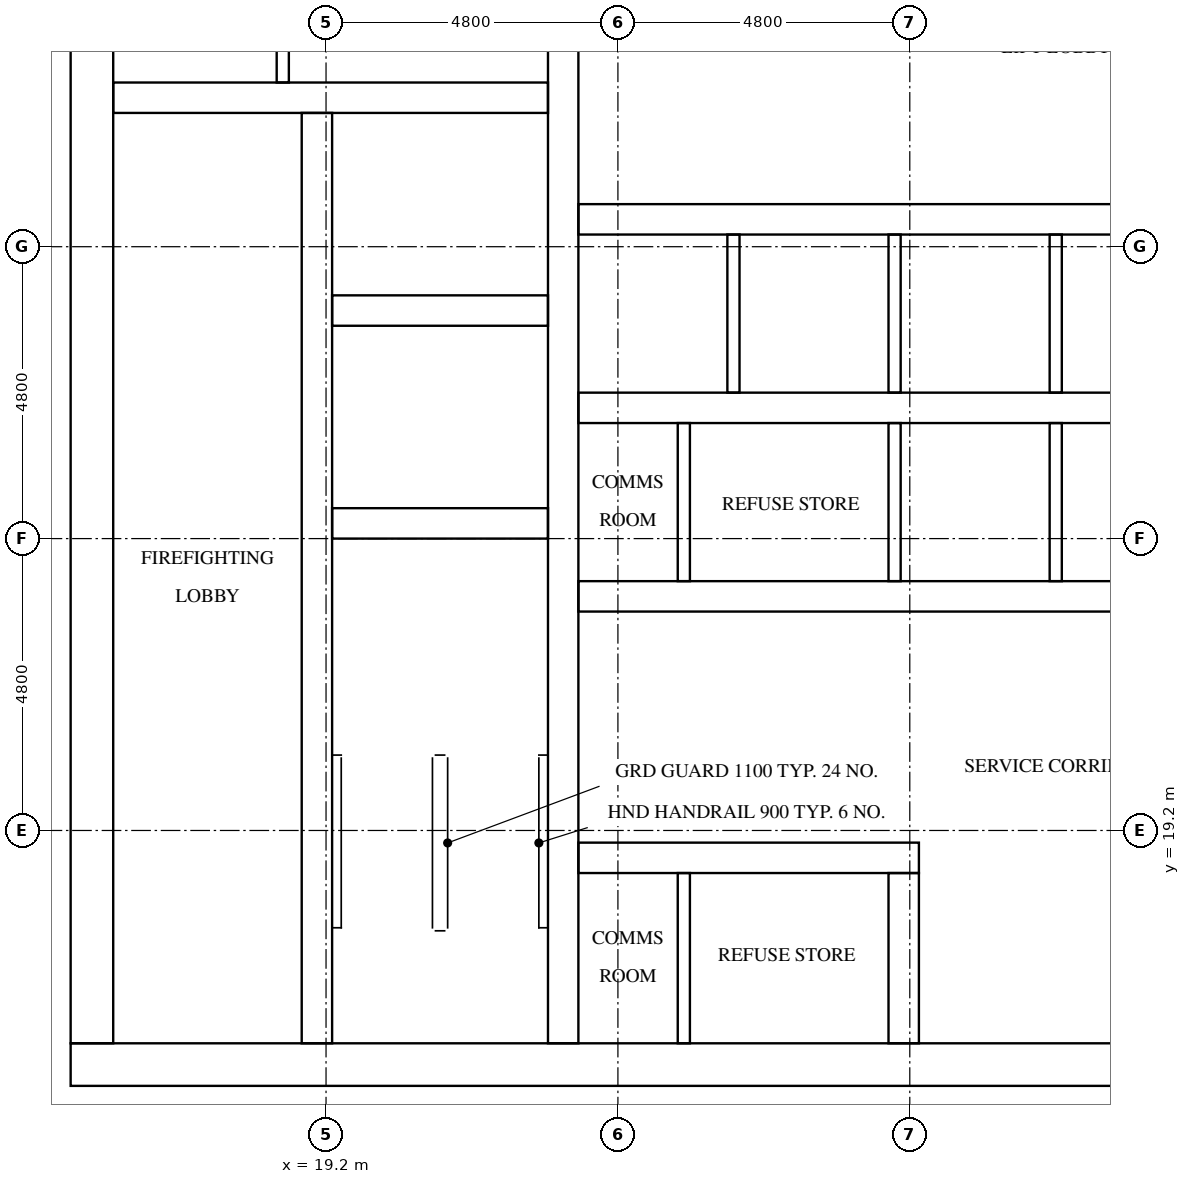
"""IFC4 building model, lengths in metres.
Left out: names, types, materials, properties, quantities, classifications, styles, units other than length and angle.
Written with IfcOpenShell. Run it as: python <this file> out.ifc"""

import sys

from ifc_helpers import new_model, si_unit, direction, frame, frame_2d, origin, place, context, subcontext, project, spatial, rectangle, extrude, element, fill, save


model = new_model("IFC4")
c1 = context("Model", 3, precision=1e-05, world=origin(), true_north=direction((0.0, 1.0)))
c2 = subcontext(c1, "Body", "Model", "MODEL_VIEW")
j1 = project(units=[si_unit("LENGTHUNIT", "METRE"), si_unit("PLANEANGLEUNIT", "RADIAN")], contexts=[c1])
p1 = place(None, origin())
s1 = spatial("IfcSite", under=j1, at=p1, CompositionType="ELEMENT")
p2 = place(p1, origin())
s2 = spatial("IfcBuilding", under=s1, at=p2, CompositionType="ELEMENT")
p3 = place(p2, frame((0.0, 0.0, 178.9)))
s3 = spatial("IfcBuildingStorey", under=s2, at=p3, CompositionType="ELEMENT", Elevation=178.9)
p4 = place(p3, frame((15.0, 15.35, 0.0), z_axis=(0.0, 0.0, 1.0), x_axis=(1.0, 0.0, 0.0)))
e1 = element("IfcWall", 1, at=p4, inside=s3, PredefinedType="SHEAR", context=c2, shape_type="SweptSolid", body=[
    extrude(rectangle(XDim=32.4, YDim=0.7, at=frame_2d((16.2, 0.0))), origin(), (0.0, 0.0, 1.0), 3.2),
])
p5 = place(p4, frame((15.3, 0.0, 0.0)))
e2 = element("IfcOpeningElement", 2, at=p5, cuts=e1, PredefinedType="OPENING", context=c2, shape_type="SweptSolid", body=[
    extrude(rectangle(XDim=1.8, YDim=2.1, at=frame_2d((0.9, 1.05))), frame((0.0, 0.36, 0.0), z_axis=(0.0, -1.0, 0.0), x_axis=(1.0, 0.0, 0.0)), (0.0, 0.0, 1.0), 0.72),
])
p6 = place(p3, frame((15.35, 15.7, 0.0), z_axis=(0.0, 0.0, 1.0), x_axis=(0.0, 1.0, 0.0)))
e3 = element("IfcWall", 3, at=p6, inside=s3, PredefinedType="SHEAR", context=c2, shape_type="SweptSolid", body=[
    extrude(rectangle(XDim=21.4, YDim=0.7, at=frame_2d((10.7, 0.0))), origin(), (0.0, 0.0, 1.0), 3.2),
])
p7 = place(p6, frame((5.06, 0.0, 0.0)))
e4 = element("IfcOpeningElement", 4, at=p7, cuts=e3, PredefinedType="OPENING", context=c2, shape_type="SweptSolid", body=[
    extrude(rectangle(XDim=1.2, YDim=2.1, at=frame_2d((0.6, 1.05))), frame((0.0, 0.36, 0.0), z_axis=(0.0, -1.0, 0.0), x_axis=(1.0, 0.0, 0.0)), (0.0, 0.0, 1.0), 0.72),
])
p8 = place(p3, frame((19.05, 15.7, 0.0), z_axis=(0.0, 0.0, 1.0), x_axis=(0.0, 1.0, 0.0)))
e5 = element("IfcWall", 5, at=p8, inside=s3, PredefinedType="SHEAR", context=c2, shape_type="SweptSolid", body=[
    extrude(rectangle(XDim=15.3, YDim=0.5, at=frame_2d((7.65, 0.0))), origin(), (0.0, 0.0, 1.0), 3.2),
])
p9 = place(p8, frame((9.75, 0.0, 0.0)))
e6 = element("IfcOpeningElement", 6, at=p9, cuts=e5, PredefinedType="OPENING", context=c2, shape_type="SweptSolid", body=[
    extrude(rectangle(XDim=1.1, YDim=2.1, at=frame_2d((0.55, 1.05))), frame((0.0, 0.26, 0.0), z_axis=(0.0, -1.0, 0.0), x_axis=(1.0, 0.0, 0.0)), (0.0, 0.0, 1.0), 0.52),
])
p10 = place(p8, frame((13.25, 0.0, 0.0)))
e7 = element("IfcOpeningElement", 7, at=p10, cuts=e5, PredefinedType="OPENING", context=c2, shape_type="SweptSolid", body=[
    extrude(rectangle(XDim=1.1, YDim=2.1, at=frame_2d((0.55, 1.05))), frame((0.0, 0.26, 0.0), z_axis=(0.0, -1.0, 0.0), x_axis=(1.0, 0.0, 0.0)), (0.0, 0.0, 1.0), 0.52),
])
p11 = place(p8, frame((0.5, 0.0, 0.0)))
e8 = element("IfcOpeningElement", 8, at=p11, cuts=e5, PredefinedType="OPENING", context=c2, shape_type="SweptSolid", body=[
    extrude(rectangle(XDim=1.2, YDim=2.1, at=frame_2d((0.6, 1.05))), frame((0.0, 0.26, 0.0), z_axis=(0.0, -1.0, 0.0), x_axis=(1.0, 0.0, 0.0)), (0.0, 0.0, 1.0), 0.52),
])
p12 = place(p3, frame((23.1, 15.7, 0.0), z_axis=(0.0, 0.0, 1.0), x_axis=(0.0, 1.0, 0.0)))
e9 = element("IfcWall", 9, at=p12, inside=s3, PredefinedType="SHEAR", context=c2, shape_type="SweptSolid", body=[
    extrude(rectangle(XDim=21.4, YDim=0.5, at=frame_2d((10.7, 0.0))), origin(), (0.0, 0.0, 1.0), 3.2),
])
for number, where, z_axis, x_axis in (
    (10, (19.3, 24.25, 0.0), (0.0, 0.0, 1.0), (1.0, 0.0, 0.0)),
    (11, (19.3, 27.75, 0.0), (0.0, 0.0, 1.0), (1.0, 0.0, 0.0)),
):
    element("IfcWall", number, at=place(p3, frame(where, z_axis=z_axis, x_axis=x_axis)), inside=s3, PredefinedType="SHEAR", context=c2, shape_type="SweptSolid", body=[
        extrude(rectangle(XDim=3.55, YDim=0.5, at=frame_2d((1.775, 0.0))), origin(), (0.0, 0.0, 1.0), 3.2),
    ])
p13 = place(p3, frame((15.7, 31.25, 0.0), z_axis=(0.0, 0.0, 1.0), x_axis=(1.0, 0.0, 0.0)))
e12 = element("IfcWall", 12, at=p13, inside=s3, PredefinedType="SHEAR", context=c2, shape_type="SweptSolid", body=[
    extrude(rectangle(XDim=7.15, YDim=0.5, at=frame_2d((3.575, 0.0))), origin(), (0.0, 0.0, 1.0), 3.2),
])
p14 = place(p3, frame((23.35, 18.75, 0.0), z_axis=(0.0, 0.0, 1.0), x_axis=(1.0, 0.0, 0.0)))
e13 = element("IfcWall", 13, at=p14, inside=s3, PredefinedType="SHEAR", context=c2, shape_type="SweptSolid", body=[
    extrude(rectangle(XDim=5.6, YDim=0.5, at=frame_2d((2.8, 0.0))), origin(), (0.0, 0.0, 1.0), 3.2),
])
p15 = place(p14, frame((0.317, 0.0, 0.0)))
e14 = element("IfcOpeningElement", 14, at=p15, cuts=e13, PredefinedType="OPENING", context=c2, shape_type="SweptSolid", body=[
    extrude(rectangle(XDim=1.0, YDim=2.1, at=frame_2d((0.5, 1.05))), frame((0.0, 0.26, 0.0), z_axis=(0.0, -1.0, 0.0), x_axis=(1.0, 0.0, 0.0)), (0.0, 0.0, 1.0), 0.52),
])
p16 = place(p14, frame((2.967, 0.0, 0.0)))
e15 = element("IfcOpeningElement", 15, at=p16, cuts=e13, PredefinedType="OPENING", context=c2, shape_type="SweptSolid", body=[
    extrude(rectangle(XDim=1.0, YDim=2.1, at=frame_2d((0.5, 1.05))), frame((0.0, 0.26, 0.0), z_axis=(0.0, -1.0, 0.0), x_axis=(1.0, 0.0, 0.0)), (0.0, 0.0, 1.0), 0.52),
])
p17 = place(p3, frame((23.35, 23.05, 0.0), z_axis=(0.0, 0.0, 1.0), x_axis=(1.0, 0.0, 0.0)))
e16 = element("IfcWall", 16, at=p17, inside=s3, PredefinedType="SHEAR", context=c2, shape_type="SweptSolid", body=[
    extrude(rectangle(XDim=15.7, YDim=0.5, at=frame_2d((7.85, 0.0))), origin(), (0.0, 0.0, 1.0), 3.2),
])
p18 = place(p17, frame((0.317, 0.0, 0.0)))
e17 = element("IfcOpeningElement", 17, at=p18, cuts=e16, PredefinedType="OPENING", context=c2, shape_type="SweptSolid", body=[
    extrude(rectangle(XDim=1.0, YDim=2.1, at=frame_2d((0.5, 1.05))), frame((0.0, 0.26, 0.0), z_axis=(0.0, -1.0, 0.0), x_axis=(1.0, 0.0, 0.0)), (0.0, 0.0, 1.0), 0.52),
])
p19 = place(p17, frame((2.967, 0.0, 0.0)))
e18 = element("IfcOpeningElement", 18, at=p19, cuts=e16, PredefinedType="OPENING", context=c2, shape_type="SweptSolid", body=[
    extrude(rectangle(XDim=1.0, YDim=2.1, at=frame_2d((0.5, 1.05))), frame((0.0, 0.26, 0.0), z_axis=(0.0, -1.0, 0.0), x_axis=(1.0, 0.0, 0.0)), (0.0, 0.0, 1.0), 0.52),
])
p20 = place(p17, frame((10.917, 0.0, 0.0)))
e19 = element("IfcOpeningElement", 19, at=p20, cuts=e16, PredefinedType="OPENING", context=c2, shape_type="SweptSolid", body=[
    extrude(rectangle(XDim=1.0, YDim=2.1, at=frame_2d((0.5, 1.05))), frame((0.0, 0.26, 0.0), z_axis=(0.0, -1.0, 0.0), x_axis=(1.0, 0.0, 0.0)), (0.0, 0.0, 1.0), 0.52),
])
p21 = place(p17, frame((13.567, 0.0, 0.0)))
e20 = element("IfcOpeningElement", 20, at=p21, cuts=e16, PredefinedType="OPENING", context=c2, shape_type="SweptSolid", body=[
    extrude(rectangle(XDim=1.0, YDim=2.1, at=frame_2d((0.5, 1.05))), frame((0.0, 0.26, 0.0), z_axis=(0.0, -1.0, 0.0), x_axis=(1.0, 0.0, 0.0)), (0.0, 0.0, 1.0), 0.52),
])
p22 = place(p3, frame((23.35, 26.15, 0.0), z_axis=(0.0, 0.0, 1.0), x_axis=(1.0, 0.0, 0.0)))
e21 = element("IfcWall", 21, at=p22, inside=s3, PredefinedType="SHEAR", context=c2, shape_type="SweptSolid", body=[
    extrude(rectangle(XDim=15.7, YDim=0.5, at=frame_2d((7.85, 0.0))), origin(), (0.0, 0.0, 1.0), 3.2),
])
p23 = place(p3, frame((23.35, 29.25, 0.0), z_axis=(0.0, 0.0, 1.0), x_axis=(1.0, 0.0, 0.0)))
e22 = element("IfcWall", 22, at=p23, inside=s3, PredefinedType="SHEAR", context=c2, shape_type="SweptSolid", body=[
    extrude(rectangle(XDim=15.7, YDim=0.5, at=frame_2d((7.85, 0.0))), origin(), (0.0, 0.0, 1.0), 3.2),
])
p24 = place(p23, frame((0.675, 0.0, 0.0)))
e23 = element("IfcOpeningElement", 23, at=p24, cuts=e22, PredefinedType="OPENING", context=c2, shape_type="SweptSolid", body=[
    extrude(rectangle(XDim=1.1, YDim=2.1, at=frame_2d((0.55, 1.05))), frame((0.0, 0.26, 0.0), z_axis=(0.0, -1.0, 0.0), x_axis=(1.0, 0.0, 0.0)), (0.0, 0.0, 1.0), 0.52),
])
p25 = place(p23, frame((3.325, 0.0, 0.0)))
e24 = element("IfcOpeningElement", 24, at=p25, cuts=e22, PredefinedType="OPENING", context=c2, shape_type="SweptSolid", body=[
    extrude(rectangle(XDim=1.1, YDim=2.1, at=frame_2d((0.55, 1.05))), frame((0.0, 0.26, 0.0), z_axis=(0.0, -1.0, 0.0), x_axis=(1.0, 0.0, 0.0)), (0.0, 0.0, 1.0), 0.52),
])
p26 = place(p23, frame((5.975, 0.0, 0.0)))
e25 = element("IfcOpeningElement", 25, at=p26, cuts=e22, PredefinedType="OPENING", context=c2, shape_type="SweptSolid", body=[
    extrude(rectangle(XDim=1.1, YDim=2.1, at=frame_2d((0.55, 1.05))), frame((0.0, 0.26, 0.0), z_axis=(0.0, -1.0, 0.0), x_axis=(1.0, 0.0, 0.0)), (0.0, 0.0, 1.0), 0.52),
])
p27 = place(p23, frame((8.625, 0.0, 0.0)))
e26 = element("IfcOpeningElement", 26, at=p27, cuts=e22, PredefinedType="OPENING", context=c2, shape_type="SweptSolid", body=[
    extrude(rectangle(XDim=1.1, YDim=2.1, at=frame_2d((0.55, 1.05))), frame((0.0, 0.26, 0.0), z_axis=(0.0, -1.0, 0.0), x_axis=(1.0, 0.0, 0.0)), (0.0, 0.0, 1.0), 0.52),
])
p28 = place(p23, frame((11.275, 0.0, 0.0)))
e27 = element("IfcOpeningElement", 27, at=p28, cuts=e22, PredefinedType="OPENING", context=c2, shape_type="SweptSolid", body=[
    extrude(rectangle(XDim=1.1, YDim=2.1, at=frame_2d((0.55, 1.05))), frame((0.0, 0.26, 0.0), z_axis=(0.0, -1.0, 0.0), x_axis=(1.0, 0.0, 0.0)), (0.0, 0.0, 1.0), 0.52),
])
p29 = place(p23, frame((13.925, 0.0, 0.0)))
e28 = element("IfcOpeningElement", 28, at=p29, cuts=e22, PredefinedType="OPENING", context=c2, shape_type="SweptSolid", body=[
    extrude(rectangle(XDim=1.1, YDim=2.1, at=frame_2d((0.55, 1.05))), frame((0.0, 0.26, 0.0), z_axis=(0.0, -1.0, 0.0), x_axis=(1.0, 0.0, 0.0)), (0.0, 0.0, 1.0), 0.52),
])
p30 = place(p3, frame((28.7, 15.7, 0.0), z_axis=(0.0, 0.0, 1.0), x_axis=(0.0, 1.0, 0.0)))
e29 = element("IfcWall", 29, at=p30, inside=s3, PredefinedType="SHEAR", context=c2, shape_type="SweptSolid", body=[
    extrude(rectangle(XDim=2.8, YDim=0.5, at=frame_2d((1.4, 0.0))), origin(), (0.0, 0.0, 1.0), 3.2),
])
p31 = place(p3, frame((25.9, 26.4, 0.0), z_axis=(0.0, 0.0, 1.0), x_axis=(0.0, 1.0, 0.0)))
e30 = element("IfcWall", 30, at=p31, inside=s3, PredefinedType="SOLIDWALL", context=c2, shape_type="SweptSolid", body=[
    extrude(rectangle(XDim=2.6, YDim=0.2, at=frame_2d((1.3, 0.0))), origin(), (0.0, 0.0, 1.0), 3.2),
])
p32 = place(p3, frame((28.55, 23.3, 0.0), z_axis=(0.0, 0.0, 1.0), x_axis=(0.0, 1.0, 0.0)))
e31 = element("IfcWall", 31, at=p32, inside=s3, PredefinedType="SOLIDWALL", context=c2, shape_type="SweptSolid", body=[
    extrude(rectangle(XDim=2.6, YDim=0.2, at=frame_2d((1.3, 0.0))), origin(), (0.0, 0.0, 1.0), 3.2),
])
p33 = place(p3, frame((28.55, 26.4, 0.0), z_axis=(0.0, 0.0, 1.0), x_axis=(0.0, 1.0, 0.0)))
e32 = element("IfcWall", 32, at=p33, inside=s3, PredefinedType="SOLIDWALL", context=c2, shape_type="SweptSolid", body=[
    extrude(rectangle(XDim=2.6, YDim=0.2, at=frame_2d((1.3, 0.0))), origin(), (0.0, 0.0, 1.0), 3.2),
])
p34 = place(p3, frame((31.2, 23.3, 0.0), z_axis=(0.0, 0.0, 1.0), x_axis=(0.0, 1.0, 0.0)))
e33 = element("IfcWall", 33, at=p34, inside=s3, PredefinedType="SOLIDWALL", context=c2, shape_type="SweptSolid", body=[
    extrude(rectangle(XDim=2.6, YDim=0.2, at=frame_2d((1.3, 0.0))), origin(), (0.0, 0.0, 1.0), 3.2),
])
p35 = place(p3, frame((31.2, 26.4, 0.0), z_axis=(0.0, 0.0, 1.0), x_axis=(0.0, 1.0, 0.0)))
e34 = element("IfcWall", 34, at=p35, inside=s3, PredefinedType="SOLIDWALL", context=c2, shape_type="SweptSolid", body=[
    extrude(rectangle(XDim=2.6, YDim=0.2, at=frame_2d((1.3, 0.0))), origin(), (0.0, 0.0, 1.0), 3.2),
])
p36 = place(p3, frame((18.489, 31.5, 0.0), z_axis=(0.0, 0.0, 1.0), x_axis=(0.0, 1.0, 0.0)))
e35 = element("IfcWall", 35, at=p36, inside=s3, PredefinedType="PARTITIONING", context=c2, shape_type="SweptSolid", body=[
    extrude(rectangle(XDim=5.6, YDim=0.2, at=frame_2d((2.8, 0.0))), origin(), (0.0, 0.0, 1.0), 3.2),
])
p37 = place(p3, frame((25.084, 23.3, 0.0), z_axis=(0.0, 0.0, 1.0), x_axis=(0.0, 1.0, 0.0)))
e36 = element("IfcWall", 36, at=p37, inside=s3, PredefinedType="PARTITIONING", context=c2, shape_type="SweptSolid", body=[
    extrude(rectangle(XDim=2.6, YDim=0.2, at=frame_2d((1.3, 0.0))), origin(), (0.0, 0.0, 1.0), 3.2),
])
p38 = place(p3, frame((25.084, 15.7, 0.0), z_axis=(0.0, 0.0, 1.0), x_axis=(0.0, 1.0, 0.0)))
e37 = element("IfcWall", 37, at=p38, inside=s3, PredefinedType="PARTITIONING", context=c2, shape_type="SweptSolid", body=[
    extrude(rectangle(XDim=2.8, YDim=0.2, at=frame_2d((1.4, 0.0))), origin(), (0.0, 0.0, 1.0), 3.2),
])
p39 = place(p24, origin())
e38 = element("IfcDoor", 38, at=p39, inside=s3, OperationType="DOUBLE_DOOR_SLIDING", PredefinedType="DOOR", context=c2, shape_type="SweptSolid", body=[
    extrude(rectangle(XDim=1.1, YDim=2.1, at=frame_2d((0.55, 1.05))), frame((0.0, 0.025, 0.0), z_axis=(0.0, -1.0, 0.0), x_axis=(1.0, 0.0, 0.0)), (0.0, 0.0, 1.0), 0.05),
])
fill(e23, e38)
p40 = place(p25, origin())
e39 = element("IfcDoor", 39, at=p40, inside=s3, OperationType="DOUBLE_DOOR_SLIDING", PredefinedType="DOOR", context=c2, shape_type="SweptSolid", body=[
    extrude(rectangle(XDim=1.1, YDim=2.1, at=frame_2d((0.55, 1.05))), frame((0.0, 0.025, 0.0), z_axis=(0.0, -1.0, 0.0), x_axis=(1.0, 0.0, 0.0)), (0.0, 0.0, 1.0), 0.05),
])
fill(e24, e39)
p41 = place(p26, origin())
e40 = element("IfcDoor", 40, at=p41, inside=s3, OperationType="DOUBLE_DOOR_SLIDING", PredefinedType="DOOR", context=c2, shape_type="SweptSolid", body=[
    extrude(rectangle(XDim=1.1, YDim=2.1, at=frame_2d((0.55, 1.05))), frame((0.0, 0.025, 0.0), z_axis=(0.0, -1.0, 0.0), x_axis=(1.0, 0.0, 0.0)), (0.0, 0.0, 1.0), 0.05),
])
fill(e25, e40)
p42 = place(p27, origin())
e41 = element("IfcDoor", 41, at=p42, inside=s3, OperationType="DOUBLE_DOOR_SLIDING", PredefinedType="DOOR", context=c2, shape_type="SweptSolid", body=[
    extrude(rectangle(XDim=1.1, YDim=2.1, at=frame_2d((0.55, 1.05))), frame((0.0, 0.025, 0.0), z_axis=(0.0, -1.0, 0.0), x_axis=(1.0, 0.0, 0.0)), (0.0, 0.0, 1.0), 0.05),
])
fill(e26, e41)
p43 = place(p9, origin())
e42 = element("IfcDoor", 42, at=p43, inside=s3, OperationType="DOUBLE_DOOR_SLIDING", PredefinedType="DOOR", context=c2, shape_type="SweptSolid", body=[
    extrude(rectangle(XDim=1.1, YDim=2.1, at=frame_2d((0.55, 1.05))), frame((0.0, 0.025, 0.0), z_axis=(0.0, -1.0, 0.0), x_axis=(1.0, 0.0, 0.0)), (0.0, 0.0, 1.0), 0.05),
])
fill(e6, e42)
p44 = place(p10, origin())
e43 = element("IfcDoor", 43, at=p44, inside=s3, OperationType="DOUBLE_DOOR_SLIDING", PredefinedType="DOOR", context=c2, shape_type="SweptSolid", body=[
    extrude(rectangle(XDim=1.1, YDim=2.1, at=frame_2d((0.55, 1.05))), frame((0.0, 0.025, 0.0), z_axis=(0.0, -1.0, 0.0), x_axis=(1.0, 0.0, 0.0)), (0.0, 0.0, 1.0), 0.05),
])
fill(e7, e43)
p45 = place(p11, frame((1.2, 0.0, 0.0), z_axis=(0.0, 0.0, 1.0), x_axis=(-1.0, 0.0, 0.0)))
e44 = element("IfcDoor", 44, at=p45, inside=s3, OperationType="SINGLE_SWING_RIGHT", PredefinedType="DOOR", context=c2, shape_type="SweptSolid", body=[
    extrude(rectangle(XDim=1.2, YDim=2.1, at=frame_2d((0.6, 1.05))), frame((0.0, 0.025, 0.0), z_axis=(0.0, -1.0, 0.0), x_axis=(1.0, 0.0, 0.0)), (0.0, 0.0, 1.0), 0.05),
])
fill(e8, e44)
p46 = place(p5, frame((1.8, 0.0, 0.0), z_axis=(0.0, 0.0, 1.0), x_axis=(-1.0, 0.0, 0.0)))
e45 = element("IfcDoor", 45, at=p46, inside=s3, OperationType="DOUBLE_DOOR_SINGLE_SWING", PredefinedType="DOOR", context=c2, shape_type="SweptSolid", body=[
    extrude(rectangle(XDim=1.8, YDim=2.1, at=frame_2d((0.9, 1.05))), frame((0.0, 0.025, 0.0), z_axis=(0.0, -1.0, 0.0), x_axis=(1.0, 0.0, 0.0)), (0.0, 0.0, 1.0), 0.05),
])
fill(e2, e45)
p47 = place(p7, frame((1.2, 0.0, 0.0), z_axis=(0.0, 0.0, 1.0), x_axis=(-1.0, 0.0, 0.0)))
e46 = element("IfcDoor", 46, at=p47, inside=s3, OperationType="SINGLE_SWING_LEFT", PredefinedType="DOOR", context=c2, shape_type="SweptSolid", body=[
    extrude(rectangle(XDim=1.2, YDim=2.1, at=frame_2d((0.6, 1.05))), frame((0.0, 0.025, 0.0), z_axis=(0.0, -1.0, 0.0), x_axis=(1.0, 0.0, 0.0)), (0.0, 0.0, 1.0), 0.05),
])
fill(e4, e46)
p48 = place(p18, frame((1.0, 0.0, 0.0), z_axis=(0.0, 0.0, 1.0), x_axis=(-1.0, 0.0, 0.0)))
e47 = element("IfcDoor", 47, at=p48, inside=s3, OperationType="SINGLE_SWING_LEFT", PredefinedType="DOOR", context=c2, shape_type="SweptSolid", body=[
    extrude(rectangle(XDim=1.0, YDim=2.1, at=frame_2d((0.5, 1.05))), frame((0.0, 0.025, 0.0), z_axis=(0.0, -1.0, 0.0), x_axis=(1.0, 0.0, 0.0)), (0.0, 0.0, 1.0), 0.05),
])
fill(e17, e47)
p49 = place(p19, frame((1.0, 0.0, 0.0), z_axis=(0.0, 0.0, 1.0), x_axis=(-1.0, 0.0, 0.0)))
e48 = element("IfcDoor", 48, at=p49, inside=s3, OperationType="SINGLE_SWING_RIGHT", PredefinedType="DOOR", context=c2, shape_type="SweptSolid", body=[
    extrude(rectangle(XDim=1.0, YDim=2.1, at=frame_2d((0.5, 1.05))), frame((0.0, 0.025, 0.0), z_axis=(0.0, -1.0, 0.0), x_axis=(1.0, 0.0, 0.0)), (0.0, 0.0, 1.0), 0.05),
])
fill(e18, e48)
p50 = place(p15, origin())
e49 = element("IfcDoor", 49, at=p50, inside=s3, OperationType="SINGLE_SWING_LEFT", PredefinedType="DOOR", context=c2, shape_type="SweptSolid", body=[
    extrude(rectangle(XDim=1.0, YDim=2.1, at=frame_2d((0.5, 1.05))), frame((0.0, 0.025, 0.0), z_axis=(0.0, -1.0, 0.0), x_axis=(1.0, 0.0, 0.0)), (0.0, 0.0, 1.0), 0.05),
])
fill(e14, e49)
p51 = place(p16, origin())
e50 = element("IfcDoor", 50, at=p51, inside=s3, OperationType="SINGLE_SWING_RIGHT", PredefinedType="DOOR", context=c2, shape_type="SweptSolid", body=[
    extrude(rectangle(XDim=1.0, YDim=2.1, at=frame_2d((0.5, 1.05))), frame((0.0, 0.025, 0.0), z_axis=(0.0, -1.0, 0.0), x_axis=(1.0, 0.0, 0.0)), (0.0, 0.0, 1.0), 0.05),
])
fill(e15, e50)
save(model, sys.argv[1])
